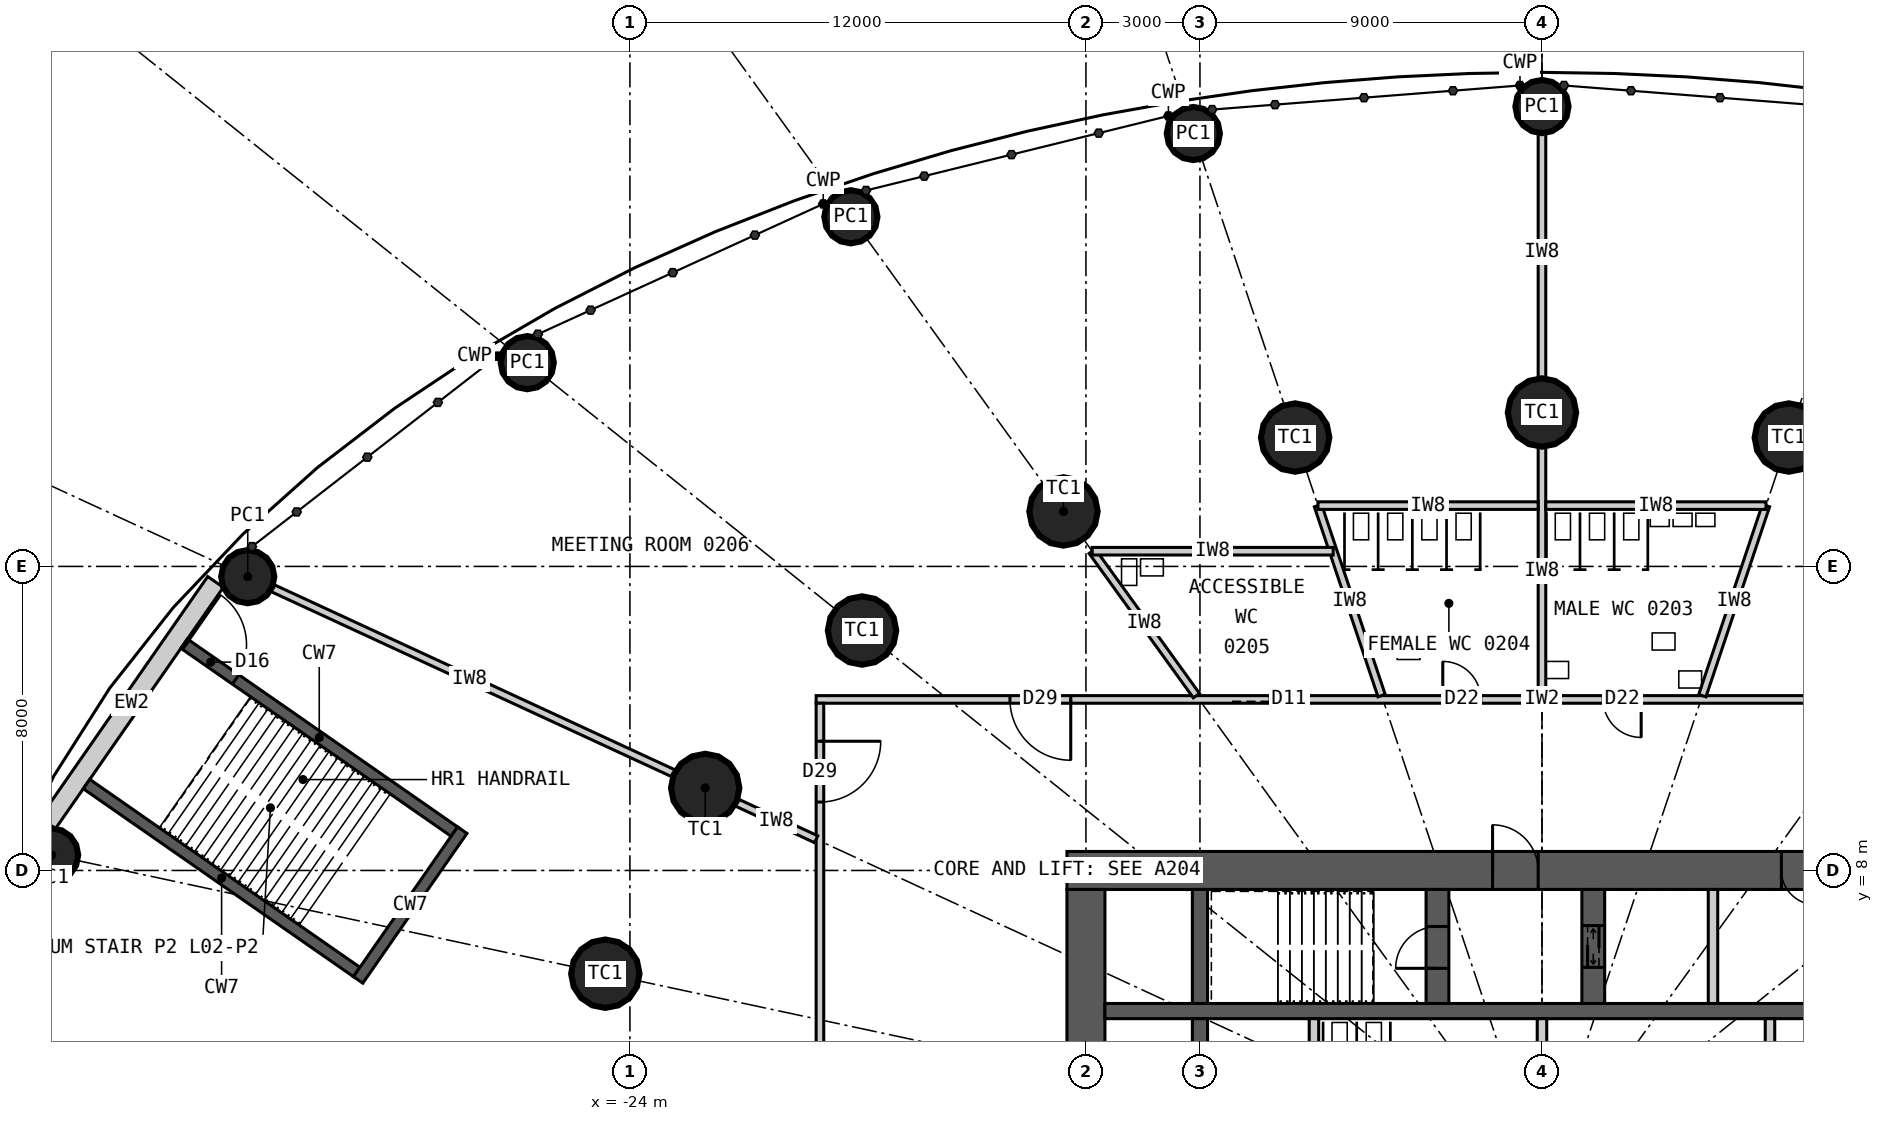
"""IFC4 building model, lengths in metres.
Left out: names, types, materials, properties, quantities, classifications, styles, units other than length and angle.
Written with IfcOpenShell. Run it as: python <this file> out.ifc"""

import sys

from ifc_helpers import new_model, si_unit, direction, frame, frame_2d, origin, origin_2d, place, context, subcontext, project, spatial, rectangle, circle, extrude, element, fill, save


model = new_model("IFC4")
c1 = context("Model", 3, precision=1e-05, world=origin(), true_north=direction((0.0, 1.0)))
c2 = subcontext(c1, "Body", "Model", "MODEL_VIEW")
j1 = project(units=[si_unit("LENGTHUNIT", "METRE"), si_unit("PLANEANGLEUNIT", "RADIAN")], contexts=[c1])
p1 = place(None, origin())
s1 = spatial("IfcSite", under=j1, at=p1, CompositionType="ELEMENT")
p2 = place(p1, origin())
s2 = spatial("IfcBuilding", under=s1, at=p2, CompositionType="ELEMENT")
p3 = place(p2, frame((0.0, 0.0, 13.8)))
s3 = spatial("IfcBuildingStorey", under=s2, at=p3, CompositionType="ELEMENT", Elevation=13.8)
for number, where, z_axis, x_axis in (
    (1, (6.495, 19.391, 0.0), (0.0, 0.0, 1.0), (1.0, 0.0, 0.0)),
    (2, (0.0, 20.05, 0.0), (0.0, 0.0, 1.0), (1.0, 0.0, 0.0)),
    (3, (-6.495, 19.391, 0.0), (0.0, 0.0, 1.0), (1.0, 0.0, 0.0)),
    (4, (-12.591, 17.447, 0.0), (0.0, 0.0, 1.0), (1.0, 0.0, 0.0)),
    (5, (-17.892, 14.313, 0.0), (0.0, 0.0, 1.0), (1.0, 0.0, 0.0)),
    (6, (-22.019, 10.17, 0.0), (0.0, 0.0, 1.0), (1.0, 0.0, 0.0)),
    (7, (-24.647, 5.283, 0.0), (0.0, 0.0, 1.0), (1.0, 0.0, 0.0)),
):
    element("IfcColumn", number, at=place(p3, frame(where, z_axis=z_axis, x_axis=x_axis)), inside=s3, PredefinedType="COLUMN", context=c2, shape_type="SweptSolid", body=[
        extrude(circle(Radius=0.9, at=origin_2d()), origin(), (0.0, 0.0, 1.0), 5.4),
    ])
for number, where, z_axis, x_axis in (
    (8, (0.0, 28.1, 0.0), (0.0, 0.0, 1.0), (1.0, 0.0, 0.0)),
    (9, (-9.174, 27.391, 0.0), (0.0, 0.0, 1.0), (1.0, 0.0, 0.0)),
    (10, (-18.186, 25.199, 0.0), (0.0, 0.0, 1.0), (1.0, 0.0, 0.0)),
    (11, (-26.702, 21.362, 0.0), (0.0, 0.0, 1.0), (1.0, 0.0, 0.0)),
    (12, (-34.057, 15.73, 0.0), (0.0, 0.0, 1.0), (1.0, 0.0, 0.0)),
    (13, (-39.218, 8.407, 0.0), (0.0, 0.0, 1.0), (1.0, 0.0, 0.0)),
):
    element("IfcColumn", number, at=place(p3, frame(where, z_axis=z_axis, x_axis=x_axis)), inside=s3, PredefinedType="COLUMN", context=c2, shape_type="SweptSolid", body=[
        extrude(circle(Radius=0.7, at=origin_2d()), origin(), (0.0, 0.0, 1.0), 5.4),
    ])
p4 = place(p3, frame((-12.5, 8.0, 0.0), z_axis=(0.0, 0.0, 1.0), x_axis=(1.0, 0.0, 0.0)))
e14 = element("IfcWall", 14, at=p4, inside=s3, PredefinedType="SHEAR", context=c2, shape_type="SweptSolid", body=[
    extrude(rectangle(XDim=25.0, YDim=1.0, at=frame_2d((12.5, 0.0))), origin(), (0.0, 0.0, 1.0), 5.4),
])
p5 = place(p4, frame((11.2, 0.0, 0.0)))
e15 = element("IfcOpeningElement", 15, at=p5, cuts=e14, PredefinedType="OPENING", context=c2, shape_type="SweptSolid", body=[
    extrude(rectangle(XDim=1.2, YDim=2.2, at=frame_2d((0.6, 1.1))), frame((0.0, 0.51, 0.0), z_axis=(0.0, -1.0, 0.0), x_axis=(1.0, 0.0, 0.0)), (0.0, 0.0, 1.0), 1.02),
])
p6 = place(p4, frame((18.8, 0.0, 0.0)))
e16 = element("IfcOpeningElement", 16, at=p6, cuts=e14, PredefinedType="OPENING", context=c2, shape_type="SweptSolid", body=[
    extrude(rectangle(XDim=0.9, YDim=2.2, at=frame_2d((0.45, 1.1))), frame((0.0, 0.51, 0.0), z_axis=(0.0, -1.0, 0.0), x_axis=(1.0, 0.0, 0.0)), (0.0, 0.0, 1.0), 1.02),
])
p7 = place(p3, frame((-12.0, 7.5, 0.0), z_axis=(0.0, 0.0, 1.0), x_axis=(0.0, -1.0, 0.0)))
e17 = element("IfcWall", 17, at=p7, inside=s3, PredefinedType="SHEAR", context=c2, shape_type="SweptSolid", body=[
    extrude(rectangle(XDim=15.0, YDim=1.0, at=frame_2d((7.5, 0.0))), origin(), (0.0, 0.0, 1.0), 5.4),
])
p8 = place(p7, frame((6.6, 0.0, 0.0)))
e18 = element("IfcOpeningElement", 18, at=p8, cuts=e17, PredefinedType="OPENING", context=c2, shape_type="SweptSolid", body=[
    extrude(rectangle(XDim=1.8, YDim=2.2, at=frame_2d((0.9, 1.1))), frame((0.0, 0.51, 0.0), z_axis=(0.0, -1.0, 0.0), x_axis=(1.0, 0.0, 0.0)), (0.0, 0.0, 1.0), 1.02),
])
p9 = place(p3, frame((-11.5, 4.3, 0.0), z_axis=(0.0, 0.0, 1.0), x_axis=(1.0, 0.0, 0.0)))
e19 = element("IfcWall", 19, at=p9, inside=s3, PredefinedType="SHEAR", context=c2, shape_type="SweptSolid", body=[
    extrude(rectangle(XDim=23.0, YDim=0.4, at=frame_2d((11.5, 0.0))), origin(), (0.0, 0.0, 1.0), 5.4),
])
p10 = place(p3, frame((-9.0, 4.5, 0.0), z_axis=(0.0, 0.0, 1.0), x_axis=(0.0, 1.0, 0.0)))
e20 = element("IfcWall", 20, at=p10, inside=s3, PredefinedType="SHEAR", context=c2, shape_type="SweptSolid", body=[
    extrude(rectangle(XDim=3.0, YDim=0.4, at=frame_2d((1.5, 0.0))), origin(), (0.0, 0.0, 1.0), 5.4),
])
p11 = place(p3, frame((-9.0, 1.75, 0.0), z_axis=(0.0, 0.0, 1.0), x_axis=(0.0, 1.0, 0.0)))
e21 = element("IfcWall", 21, at=p11, inside=s3, PredefinedType="SHEAR", context=c2, shape_type="SweptSolid", body=[
    extrude(rectangle(XDim=2.35, YDim=0.4, at=frame_2d((1.175, 0.0))), origin(), (0.0, 0.0, 1.0), 5.4),
])
p12 = place(p3, frame((-2.75, 4.5, 0.0), z_axis=(0.0, 0.0, 1.0), x_axis=(0.0, 1.0, 0.0)))
e22 = element("IfcWall", 22, at=p12, inside=s3, PredefinedType="SHEAR", context=c2, shape_type="SweptSolid", body=[
    extrude(rectangle(XDim=3.0, YDim=0.6, at=frame_2d((1.5, 0.0))), origin(), (0.0, 0.0, 1.0), 5.4),
])
p13 = place(p12, frame((0.925, 0.0, 0.0)))
e23 = element("IfcOpeningElement", 23, at=p13, cuts=e22, PredefinedType="OPENING", context=c2, shape_type="SweptSolid", body=[
    extrude(rectangle(XDim=1.1, YDim=2.2, at=frame_2d((0.55, 1.1))), frame((0.0, 0.31, 0.0), z_axis=(0.0, -1.0, 0.0), x_axis=(1.0, 0.0, 0.0)), (0.0, 0.0, 1.0), 0.62),
])
p14 = place(p3, frame((1.35, 4.5, 0.0), z_axis=(0.0, 0.0, 1.0), x_axis=(0.0, 1.0, 0.0)))
e24 = element("IfcWall", 24, at=p14, inside=s3, PredefinedType="SHEAR", context=c2, shape_type="SweptSolid", body=[
    extrude(rectangle(XDim=3.0, YDim=0.6, at=frame_2d((1.5, 0.0))), origin(), (0.0, 0.0, 1.0), 5.4),
])
p15 = place(p14, frame((0.95, 0.0, 0.0)))
e25 = element("IfcOpeningElement", 25, at=p15, cuts=e24, PredefinedType="OPENING", context=c2, shape_type="SweptSolid", body=[
    extrude(rectangle(XDim=1.1, YDim=2.2, at=frame_2d((0.55, 1.1))), frame((0.0, 0.31, 0.0), z_axis=(0.0, -1.0, 0.0), x_axis=(1.0, 0.0, 0.0)), (0.0, 0.0, 1.0), 0.62),
])
p16 = place(p3, frame((4.5, 4.5, 0.0), z_axis=(0.0, 0.0, 1.0), x_axis=(0.0, 1.0, 0.0)))
e26 = element("IfcWall", 26, at=p16, inside=s3, PredefinedType="PARTITIONING", context=c2, shape_type="SweptSolid", body=[
    extrude(rectangle(XDim=3.0, YDim=0.25, at=frame_2d((1.5, 0.0))), origin(), (0.0, 0.0, 1.0), 5.4),
])
for number, where, z_axis, x_axis in (
    (27, (-6.0, 1.75, 0.0), (0.0, 0.0, 1.0), (0.0, 1.0, 0.0)),
    (28, (0.0, 1.75, 0.0), (0.0, 0.0, 1.0), (0.0, 1.0, 0.0)),
    (29, (6.0, 1.75, 0.0), (0.0, 0.0, 1.0), (0.0, 1.0, 0.0)),
):
    element("IfcWall", number, at=place(p3, frame(where, z_axis=z_axis, x_axis=x_axis)), inside=s3, PredefinedType="PARTITIONING", context=c2, shape_type="SweptSolid", body=[
        extrude(rectangle(XDim=2.35, YDim=0.25, at=frame_2d((1.175, 0.0))), origin(), (0.0, 0.0, 1.0), 5.4),
    ])
p17 = place(p3, frame((-34.905, 15.592, 0.0), z_axis=(0.0, 0.0, 1.0), x_axis=(-0.571029335057, -0.820929655028, 0.0)))
e30 = element("IfcWall", 30, at=p17, inside=s3, PredefinedType="SOLIDWALL", context=c2, shape_type="SweptSolid", body=[
    extrude(rectangle(XDim=7.733, YDim=0.5, at=frame_2d((3.866, 0.0))), origin(), (0.0, 0.0, 1.0), 5.15),
])
p18 = place(p3, frame((-19.1, 12.5, 0.0), z_axis=(0.0, 0.0, 1.0), x_axis=(1.0, 0.0, 0.0)))
e31 = element("IfcWall", 31, at=p18, inside=s3, PredefinedType="PARTITIONING", context=c2, shape_type="SweptSolid", body=[
    extrude(rectangle(XDim=38.2, YDim=0.2, at=frame_2d((19.1, 0.0))), origin(), (0.0, 0.0, 1.0), 5.15),
])
p19 = place(p18, frame((26.32, 0.0, 0.0)))
e32 = element("IfcOpeningElement", 32, at=p19, cuts=e31, PredefinedType="OPENING", context=c2, shape_type="SweptSolid", body=[
    extrude(rectangle(XDim=1.6, YDim=2.4, at=frame_2d((0.8, 1.2))), frame((0.0, 0.11, 0.0), z_axis=(0.0, -1.0, 0.0), x_axis=(1.0, 0.0, 0.0)), (0.0, 0.0, 1.0), 0.22),
])
p20 = place(p18, frame((20.71, 0.0, 0.0)))
e33 = element("IfcOpeningElement", 33, at=p20, cuts=e31, PredefinedType="OPENING", context=c2, shape_type="SweptSolid", body=[
    extrude(rectangle(XDim=1.0, YDim=2.1, at=frame_2d((0.5, 1.05))), frame((0.0, 0.11, 0.0), z_axis=(0.0, -1.0, 0.0), x_axis=(1.0, 0.0, 0.0)), (0.0, 0.0, 1.0), 0.22),
])
p21 = place(p18, frame((16.49, 0.0, 0.0)))
e34 = element("IfcOpeningElement", 34, at=p21, cuts=e31, PredefinedType="OPENING", context=c2, shape_type="SweptSolid", body=[
    extrude(rectangle(XDim=1.0, YDim=2.1, at=frame_2d((0.5, 1.05))), frame((0.0, 0.11, 0.0), z_axis=(0.0, -1.0, 0.0), x_axis=(1.0, 0.0, 0.0)), (0.0, 0.0, 1.0), 0.22),
])
p22 = place(p18, frame((11.943, 0.0, 0.0)))
e35 = element("IfcOpeningElement", 35, at=p22, cuts=e31, PredefinedType="OPENING", context=c2, shape_type="SweptSolid", body=[
    extrude(rectangle(XDim=1.0, YDim=2.2, at=frame_2d((0.5, 1.1))), frame((0.0, 0.11, 0.0), z_axis=(0.0, -1.0, 0.0), x_axis=(1.0, 0.0, 0.0)), (0.0, 0.0, 1.0), 0.22),
])
p23 = place(p18, frame((5.1, 0.0, 0.0)))
e36 = element("IfcOpeningElement", 36, at=p23, cuts=e31, PredefinedType="OPENING", context=c2, shape_type="SweptSolid", body=[
    extrude(rectangle(XDim=1.6, YDim=2.4, at=frame_2d((0.8, 1.2))), frame((0.0, 0.11, 0.0), z_axis=(0.0, -1.0, 0.0), x_axis=(1.0, 0.0, 0.0)), (0.0, 0.0, 1.0), 0.22),
])
p24 = place(p18, frame((33.02, 0.0, 0.0)))
e37 = element("IfcOpeningElement", 37, at=p24, cuts=e31, PredefinedType="OPENING", context=c2, shape_type="SweptSolid", body=[
    extrude(rectangle(XDim=1.6, YDim=2.4, at=frame_2d((0.8, 1.2))), frame((0.0, 0.11, 0.0), z_axis=(0.0, -1.0, 0.0), x_axis=(1.0, 0.0, 0.0)), (0.0, 0.0, 1.0), 0.22),
])
p25 = place(p3, frame((-19.0, 12.4, 0.0), z_axis=(0.0, 0.0, 1.0), x_axis=(0.0, -1.0, 0.0)))
e38 = element("IfcWall", 38, at=p25, inside=s3, PredefinedType="PARTITIONING", context=c2, shape_type="SweptSolid", body=[
    extrude(rectangle(XDim=24.8, YDim=0.2, at=frame_2d((12.4, 0.0))), origin(), (0.0, 0.0, 1.0), 5.15),
])
p26 = place(p25, frame((9.436, 0.0, 0.0)))
e39 = element("IfcOpeningElement", 39, at=p26, cuts=e38, PredefinedType="OPENING", context=c2, shape_type="SweptSolid", body=[
    extrude(rectangle(XDim=1.2, YDim=2.2, at=frame_2d((0.6, 1.1))), frame((0.0, 0.11, 0.0), z_axis=(0.0, -1.0, 0.0), x_axis=(1.0, 0.0, 0.0)), (0.0, 0.0, 1.0), 0.22),
])
p27 = place(p25, frame((19.947, 0.0, 0.0)))
e40 = element("IfcOpeningElement", 40, at=p27, cuts=e38, PredefinedType="OPENING", context=c2, shape_type="SweptSolid", body=[
    extrude(rectangle(XDim=1.6, YDim=2.4, at=frame_2d((0.8, 1.2))), frame((0.0, 0.11, 0.0), z_axis=(0.0, -1.0, 0.0), x_axis=(1.0, 0.0, 0.0)), (0.0, 0.0, 1.0), 0.22),
])
p28 = place(p25, frame((1.0, 0.0, 0.0)))
e41 = element("IfcOpeningElement", 41, at=p28, cuts=e38, PredefinedType="OPENING", context=c2, shape_type="SweptSolid", body=[
    extrude(rectangle(XDim=1.6, YDim=2.4, at=frame_2d((0.8, 1.2))), frame((0.0, 0.11, 0.0), z_axis=(0.0, -1.0, 0.0), x_axis=(1.0, 0.0, 0.0)), (0.0, 0.0, 1.0), 0.22),
])
p29 = place(p3, frame((4.22, 12.6, 0.0), z_axis=(0.0, 0.0, 1.0), x_axis=(0.317574790206, 0.948233226915, 0.0)))
e42 = element("IfcWall", 42, at=p29, inside=s3, PredefinedType="PARTITIONING", context=c2, shape_type="SweptSolid", body=[
    extrude(rectangle(XDim=5.273, YDim=0.2, at=frame_2d((2.636, 0.0))), origin(), (0.0, 0.0, 1.0), 4.3),
])
p30 = place(p3, frame((0.0, 12.6, 0.0), z_axis=(0.0, 0.0, 1.0), x_axis=(0.0, 1.0, 0.0)))
e43 = element("IfcWall", 43, at=p30, inside=s3, PredefinedType="PARTITIONING", context=c2, shape_type="SweptSolid", body=[
    extrude(rectangle(XDim=6.55, YDim=0.2, at=frame_2d((3.275, 0.0))), origin(), (0.0, 0.0, 1.0), 4.3),
])
p31 = place(p3, frame((0.0, 20.95, 0.0), z_axis=(0.0, 0.0, 1.0), x_axis=(0.0, 1.0, 0.0)))
e44 = element("IfcWall", 44, at=p31, inside=s3, PredefinedType="PARTITIONING", context=c2, shape_type="SweptSolid", body=[
    extrude(rectangle(XDim=6.65, YDim=0.2, at=frame_2d((3.325, 0.0))), origin(), (0.0, 0.0, 1.0), 4.25),
])
p32 = place(p3, frame((-4.22, 12.6, 0.0), z_axis=(0.0, 0.0, 1.0), x_axis=(-0.317574790206, 0.948233226915, 0.0)))
e45 = element("IfcWall", 45, at=p32, inside=s3, PredefinedType="PARTITIONING", context=c2, shape_type="SweptSolid", body=[
    extrude(rectangle(XDim=5.273, YDim=0.2, at=frame_2d((2.636, 0.0))), origin(), (0.0, 0.0, 1.0), 4.3),
])
p33 = place(p3, frame((-9.093, 12.6, 0.0), z_axis=(0.0, 0.0, 1.0), x_axis=(-0.585228020299, 0.810868771292, 0.0)))
e46 = element("IfcWall", 46, at=p33, inside=s3, PredefinedType="PARTITIONING", context=c2, shape_type="SweptSolid", body=[
    extrude(rectangle(XDim=4.686, YDim=0.2, at=frame_2d((2.343, 0.0))), origin(), (0.0, 0.0, 1.0), 4.3),
])
p34 = place(p3, frame((-19.1, 8.822, 0.0), z_axis=(0.0, 0.0, 1.0), x_axis=(-0.907872952542, 0.419245395971, 0.0)))
e47 = element("IfcWall", 47, at=p34, inside=s3, PredefinedType="PARTITIONING", context=c2, shape_type="SweptSolid", body=[
    extrude(rectangle(XDim=2.315, YDim=0.2, at=frame_2d((1.158, 0.0))), origin(), (0.0, 0.0, 1.0), 4.45),
])
p35 = place(p3, frame((-22.836, 10.548, 0.0), z_axis=(0.0, 0.0, 1.0), x_axis=(-0.90784065247, 0.419315334471, 0.0)))
e48 = element("IfcWall", 48, at=p35, inside=s3, PredefinedType="PARTITIONING", context=c2, shape_type="SweptSolid", body=[
    extrude(rectangle(XDim=11.86, YDim=0.2, at=frame_2d((5.93, 0.0))), origin(), (0.0, 0.0, 1.0), 4.25),
])
p36 = place(p3, frame((-35.729, 13.968, 0.0), z_axis=(0.0, 0.0, 1.0), x_axis=(0.82092761123, -0.571032273274, 0.0)))
e49 = element("IfcWall", 49, at=p36, inside=s3, PredefinedType="SHEAR", context=c2, shape_type="SweptSolid", body=[
    extrude(rectangle(XDim=8.66, YDim=0.3, at=frame_2d((4.33, 0.0))), origin(), (0.0, 0.0, 1.0), 5.4),
])
p37 = place(p36, frame((0.05, 0.0, 0.0)))
e50 = element("IfcOpeningElement", 50, at=p37, cuts=e49, PredefinedType="OPENING", context=c2, shape_type="SweptSolid", body=[
    extrude(rectangle(XDim=1.6, YDim=2.1, at=frame_2d((0.8, 1.05))), frame((0.0, 0.16, 0.0), z_axis=(0.0, -1.0, 0.0), x_axis=(1.0, 0.0, 0.0)), (0.0, 0.0, 1.0), 0.32),
])
p38 = place(p3, frame((-38.299, 10.274, 0.0), z_axis=(0.0, 0.0, 1.0), x_axis=(0.820936803751, -0.571019057692, 0.0)))
e51 = element("IfcWall", 51, at=p38, inside=s3, PredefinedType="SHEAR", context=c2, shape_type="SweptSolid", body=[
    extrude(rectangle(XDim=8.66, YDim=0.3, at=frame_2d((4.33, 0.0))), origin(), (0.0, 0.0, 1.0), 5.4),
])
p39 = place(p3, frame((-28.412, 9.06, 0.0), z_axis=(0.0, 0.0, 1.0), x_axis=(-0.571036173178, -0.820924898467, 0.0)))
e52 = element("IfcWall", 52, at=p39, inside=s3, PredefinedType="SHEAR", context=c2, shape_type="SweptSolid", body=[
    extrude(rectangle(XDim=4.8, YDim=0.3, at=frame_2d((2.4, 0.0))), origin(), (0.0, 0.0, 1.0), 5.4),
])
for number, where, z_axis, x_axis in (
    (53, (5.895, 17.6, 0.0), (0.0, 0.0, 1.0), (-1.0, 0.0, 0.0)),
    (54, (-0.1, 17.6, 0.0), (0.0, 0.0, 1.0), (-1.0, 0.0, 0.0)),
):
    element("IfcWall", number, at=place(p3, frame(where, z_axis=z_axis, x_axis=x_axis)), inside=s3, PredefinedType="PARTITIONING", context=c2, shape_type="SweptSolid", body=[
        extrude(rectangle(XDim=5.795, YDim=0.2, at=frame_2d((2.897, 0.0))), origin(), (0.0, 0.0, 1.0), 5.15),
    ])
p40 = place(p3, frame((-5.493, 16.4, 0.0), z_axis=(0.0, 0.0, 1.0), x_axis=(-1.0, 0.0, 0.0)))
e55 = element("IfcWall", 55, at=p40, inside=s3, PredefinedType="PARTITIONING", context=c2, shape_type="SweptSolid", body=[
    extrude(rectangle(XDim=6.343, YDim=0.2, at=frame_2d((3.171, 0.0))), origin(), (0.0, 0.0, 1.0), 4.5),
])
p41 = place(p37, origin())
e56 = element("IfcDoor", 56, at=p41, inside=s3, OperationType="SINGLE_SWING_LEFT", PredefinedType="DOOR", context=c2, shape_type="SweptSolid", body=[
    extrude(rectangle(XDim=1.6, YDim=2.1, at=frame_2d((0.8, 1.05))), frame((0.0, 0.025, 0.0), z_axis=(0.0, -1.0, 0.0), x_axis=(1.0, 0.0, 0.0)), (0.0, 0.0, 1.0), 0.05),
])
fill(e50, e56)
p42 = place(p20, origin())
e57 = element("IfcDoor", 57, at=p42, inside=s3, OperationType="SINGLE_SWING_RIGHT", PredefinedType="DOOR", context=c2, shape_type="SweptSolid", body=[
    extrude(rectangle(XDim=1.0, YDim=2.1, at=frame_2d((0.5, 1.05))), frame((0.0, 0.025, 0.0), z_axis=(0.0, -1.0, 0.0), x_axis=(1.0, 0.0, 0.0)), (0.0, 0.0, 1.0), 0.05),
])
fill(e33, e57)
p43 = place(p21, origin())
e58 = element("IfcDoor", 58, at=p43, inside=s3, OperationType="SINGLE_SWING_LEFT", PredefinedType="DOOR", context=c2, shape_type="SweptSolid", body=[
    extrude(rectangle(XDim=1.0, YDim=2.1, at=frame_2d((0.5, 1.05))), frame((0.0, 0.025, 0.0), z_axis=(0.0, -1.0, 0.0), x_axis=(1.0, 0.0, 0.0)), (0.0, 0.0, 1.0), 0.05),
])
fill(e34, e58)
p44 = place(p22, origin())
e59 = element("IfcDoor", 59, at=p44, inside=s3, OperationType="SLIDING_TO_LEFT", PredefinedType="DOOR", context=c2, shape_type="SweptSolid", body=[
    extrude(rectangle(XDim=1.0, YDim=2.2, at=frame_2d((0.5, 1.1))), frame((0.0, 0.025, 0.0), z_axis=(0.0, -1.0, 0.0), x_axis=(1.0, 0.0, 0.0)), (0.0, 0.0, 1.0), 0.05),
])
fill(e35, e59)
p45 = place(p23, origin())
e60 = element("IfcDoor", 60, at=p45, inside=s3, OperationType="DOUBLE_DOOR_DOUBLE_SWING", PredefinedType="DOOR", context=c2, shape_type="SweptSolid", body=[
    extrude(rectangle(XDim=1.6, YDim=2.4, at=frame_2d((0.8, 1.2))), frame((0.0, 0.025, 0.0), z_axis=(0.0, -1.0, 0.0), x_axis=(1.0, 0.0, 0.0)), (0.0, 0.0, 1.0), 0.05),
])
fill(e36, e60)
p46 = place(p5, origin())
e61 = element("IfcDoor", 61, at=p46, inside=s3, OperationType="SINGLE_SWING_LEFT", PredefinedType="DOOR", context=c2, shape_type="SweptSolid", body=[
    extrude(rectangle(XDim=1.2, YDim=2.2, at=frame_2d((0.6, 1.1))), frame((0.0, 0.025, 0.0), z_axis=(0.0, -1.0, 0.0), x_axis=(1.0, 0.0, 0.0)), (0.0, 0.0, 1.0), 0.05),
])
fill(e15, e61)
p47 = place(p13, origin())
e62 = element("IfcDoor", 62, at=p47, inside=s3, OperationType="SINGLE_SWING_LEFT", PredefinedType="DOOR", context=c2, shape_type="SweptSolid", body=[
    extrude(rectangle(XDim=1.1, YDim=2.2, at=frame_2d((0.55, 1.1))), frame((0.0, 0.025, 0.0), z_axis=(0.0, -1.0, 0.0), x_axis=(1.0, 0.0, 0.0)), (0.0, 0.0, 1.0), 0.05),
])
fill(e23, e62)
p48 = place(p15, origin())
e63 = element("IfcDoor", 63, at=p48, inside=s3, OperationType="DOUBLE_DOOR_SLIDING", PredefinedType="DOOR", context=c2, shape_type="SweptSolid", body=[
    extrude(rectangle(XDim=1.1, YDim=2.2, at=frame_2d((0.55, 1.1))), frame((0.0, 0.025, 0.0), z_axis=(0.0, -1.0, 0.0), x_axis=(1.0, 0.0, 0.0)), (0.0, 0.0, 1.0), 0.05),
])
fill(e25, e63)
p49 = place(p6, origin())
e64 = element("IfcDoor", 64, at=p49, inside=s3, OperationType="SINGLE_SWING_RIGHT", PredefinedType="DOOR", context=c2, shape_type="SweptSolid", body=[
    extrude(rectangle(XDim=0.9, YDim=2.2, at=frame_2d((0.45, 1.1))), frame((0.0, 0.025, 0.0), z_axis=(0.0, -1.0, 0.0), x_axis=(1.0, 0.0, 0.0)), (0.0, 0.0, 1.0), 0.05),
])
fill(e16, e64)
p50 = place(p28, origin())
e65 = element("IfcDoor", 65, at=p50, inside=s3, OperationType="DOUBLE_DOOR_DOUBLE_SWING", PredefinedType="DOOR", context=c2, shape_type="SweptSolid", body=[
    extrude(rectangle(XDim=1.6, YDim=2.4, at=frame_2d((0.8, 1.2))), frame((0.0, 0.025, 0.0), z_axis=(0.0, -1.0, 0.0), x_axis=(1.0, 0.0, 0.0)), (0.0, 0.0, 1.0), 0.05),
])
fill(e41, e65)
save(model, sys.argv[1])
